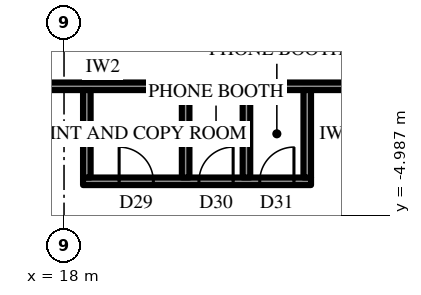
"""IFC4 building model, lengths in metres.
Left out: names, types, materials, properties, quantities, classifications, styles, units other than length and angle.
Written with IfcOpenShell. Run it as: python <this file> out.ifc"""

import sys

from ifc_helpers import new_model, si_unit, direction, frame, frame_2d, origin, place, context, subcontext, project, spatial, rectangle, extrude, element, fill, save


model = new_model("IFC4")
c1 = context("Model", 3, precision=1e-05, world=origin(), true_north=direction((0.0, 1.0)))
c2 = subcontext(c1, "Body", "Model", "MODEL_VIEW")
j1 = project(units=[si_unit("LENGTHUNIT", "METRE"), si_unit("PLANEANGLEUNIT", "RADIAN")], contexts=[c1])
p1 = place(None, origin())
s1 = spatial("IfcSite", under=j1, at=p1, CompositionType="ELEMENT")
p2 = place(p1, origin())
s2 = spatial("IfcBuilding", under=s1, at=p2, CompositionType="ELEMENT")
p3 = place(p2, frame((0.0, 0.0, 340.9)))
s3 = spatial("IfcBuildingStorey", under=s2, at=p3, CompositionType="ELEMENT", Elevation=340.9)
p4 = place(p3, frame((24.677, -10.458, 0.0), z_axis=(0.0, 0.0, 1.0), x_axis=(0.499996453679, 0.866027451244, 0.0)))
e1 = element("IfcWall", 1, at=p4, inside=s3, PredefinedType="SOLIDWALL", context=c2, shape_type="SweptSolid", body=[
    extrude(rectangle(XDim=9.564, YDim=0.3, at=frame_2d((4.782, 0.0))), origin(), (0.0, 0.0, 1.0), 2.9),
])
p5 = place(p4, frame((1.866, 0.0, 0.6)))
e2 = element("IfcOpeningElement", 2, at=p5, cuts=e1, PredefinedType="OPENING", context=c2, shape_type="SweptSolid", body=[
    extrude(rectangle(XDim=2.55, YDim=2.05, at=frame_2d((1.275, 1.025))), frame((0.0, 0.16, 0.0), z_axis=(0.0, -1.0, 0.0), x_axis=(1.0, 0.0, 0.0)), (0.0, 0.0, 1.0), 0.32),
])
p6 = place(p4, frame((6.148, 0.0, 0.6)))
e3 = element("IfcOpeningElement", 3, at=p6, cuts=e1, PredefinedType="OPENING", context=c2, shape_type="SweptSolid", body=[
    extrude(rectangle(XDim=2.55, YDim=2.05, at=frame_2d((1.275, 1.025))), frame((0.0, 0.16, 0.0), z_axis=(0.0, -1.0, 0.0), x_axis=(1.0, 0.0, 0.0)), (0.0, 0.0, 1.0), 0.32),
])
p7 = place(p3, frame((12.425, -1.6, 0.0), z_axis=(0.0, 0.0, 1.0), x_axis=(1.0, 0.0, 0.0)))
e4 = element("IfcWall", 4, at=p7, inside=s3, PredefinedType="PARTITIONING", context=c2, shape_type="SweptSolid", body=[
    extrude(rectangle(XDim=16.5, YDim=0.2, at=frame_2d((8.25, 0.0))), origin(), (0.0, 0.0, 1.0), 4.0),
])
p8 = place(p7, frame((1.15, 0.0, 0.0)))
e5 = element("IfcOpeningElement", 5, at=p8, cuts=e4, PredefinedType="OPENING", context=c2, shape_type="SweptSolid", body=[
    extrude(rectangle(XDim=1.0, YDim=2.2, at=frame_2d((0.5, 1.1))), frame((0.0, 0.11, 0.0), z_axis=(0.0, -1.0, 0.0), x_axis=(1.0, 0.0, 0.0)), (0.0, 0.0, 1.0), 0.22),
])
p9 = place(p3, frame((18.5, -4.1, 0.0), z_axis=(0.0, 0.0, 1.0), x_axis=(1.0, 0.0, 0.0)))
e6 = element("IfcWall", 6, at=p9, inside=s3, PredefinedType="PARTITIONING", context=c2, shape_type="SweptSolid", body=[
    extrude(rectangle(XDim=6.0, YDim=0.2, at=frame_2d((3.0, 0.0))), origin(), (0.0, 0.0, 1.0), 4.0),
])
p10 = place(p9, frame((0.95, 0.0, 0.0)))
e7 = element("IfcOpeningElement", 7, at=p10, cuts=e6, PredefinedType="OPENING", context=c2, shape_type="SweptSolid", body=[
    extrude(rectangle(XDim=0.9, YDim=2.2, at=frame_2d((0.45, 1.1))), frame((0.0, 0.11, 0.0), z_axis=(0.0, -1.0, 0.0), x_axis=(1.0, 0.0, 0.0)), (0.0, 0.0, 1.0), 0.22),
])
p11 = place(p9, frame((3.05, 0.0, 0.0)))
e8 = element("IfcOpeningElement", 8, at=p11, cuts=e6, PredefinedType="OPENING", context=c2, shape_type="SweptSolid", body=[
    extrude(rectangle(XDim=0.9, YDim=2.2, at=frame_2d((0.45, 1.1))), frame((0.0, 0.11, 0.0), z_axis=(0.0, -1.0, 0.0), x_axis=(1.0, 0.0, 0.0)), (0.0, 0.0, 1.0), 0.22),
])
p12 = place(p9, frame((4.65, 0.0, 0.0)))
e9 = element("IfcOpeningElement", 9, at=p12, cuts=e6, PredefinedType="OPENING", context=c2, shape_type="SweptSolid", body=[
    extrude(rectangle(XDim=0.9, YDim=2.2, at=frame_2d((0.45, 1.1))), frame((0.0, 0.11, 0.0), z_axis=(0.0, -1.0, 0.0), x_axis=(1.0, 0.0, 0.0)), (0.0, 0.0, 1.0), 0.22),
])
for number, where, z_axis, x_axis in (
    (10, (18.6, -1.7, 0.0), (0.0, 0.0, 1.0), (0.0, -1.0, 0.0)),
    (11, (21.2, -1.7, 0.0), (0.0, 0.0, 1.0), (0.0, -1.0, 0.0)),
    (12, (22.8, -1.7, 0.0), (0.0, 0.0, 1.0), (0.0, -1.0, 0.0)),
    (13, (24.4, -1.7, 0.0), (0.0, 0.0, 1.0), (0.0, -1.0, 0.0)),
):
    element("IfcWall", number, at=place(p3, frame(where, z_axis=z_axis, x_axis=x_axis)), inside=s3, PredefinedType="PARTITIONING", context=c2, shape_type="SweptSolid", body=[
        extrude(rectangle(XDim=2.3, YDim=0.2, at=frame_2d((1.15, 0.0))), origin(), (0.0, 0.0, 1.0), 4.0),
    ])
p13 = place(p10, origin())
e14 = element("IfcDoor", 14, at=p13, inside=s3, OperationType="SINGLE_SWING_RIGHT", PredefinedType="DOOR", context=c2, shape_type="SweptSolid", body=[
    extrude(rectangle(XDim=0.9, YDim=2.2, at=frame_2d((0.45, 1.1))), frame((0.0, 0.025, 0.0), z_axis=(0.0, -1.0, 0.0), x_axis=(1.0, 0.0, 0.0)), (0.0, 0.0, 1.0), 0.05),
])
fill(e7, e14)
p14 = place(p11, origin())
e15 = element("IfcDoor", 15, at=p14, inside=s3, OperationType="SINGLE_SWING_LEFT", PredefinedType="DOOR", context=c2, shape_type="SweptSolid", body=[
    extrude(rectangle(XDim=0.9, YDim=2.2, at=frame_2d((0.45, 1.1))), frame((0.0, 0.025, 0.0), z_axis=(0.0, -1.0, 0.0), x_axis=(1.0, 0.0, 0.0)), (0.0, 0.0, 1.0), 0.05),
])
fill(e8, e15)
p15 = place(p12, origin())
e16 = element("IfcDoor", 16, at=p15, inside=s3, OperationType="SINGLE_SWING_LEFT", PredefinedType="DOOR", context=c2, shape_type="SweptSolid", body=[
    extrude(rectangle(XDim=0.9, YDim=2.2, at=frame_2d((0.45, 1.1))), frame((0.0, 0.025, 0.0), z_axis=(0.0, -1.0, 0.0), x_axis=(1.0, 0.0, 0.0)), (0.0, 0.0, 1.0), 0.05),
])
fill(e9, e16)
save(model, sys.argv[1])
